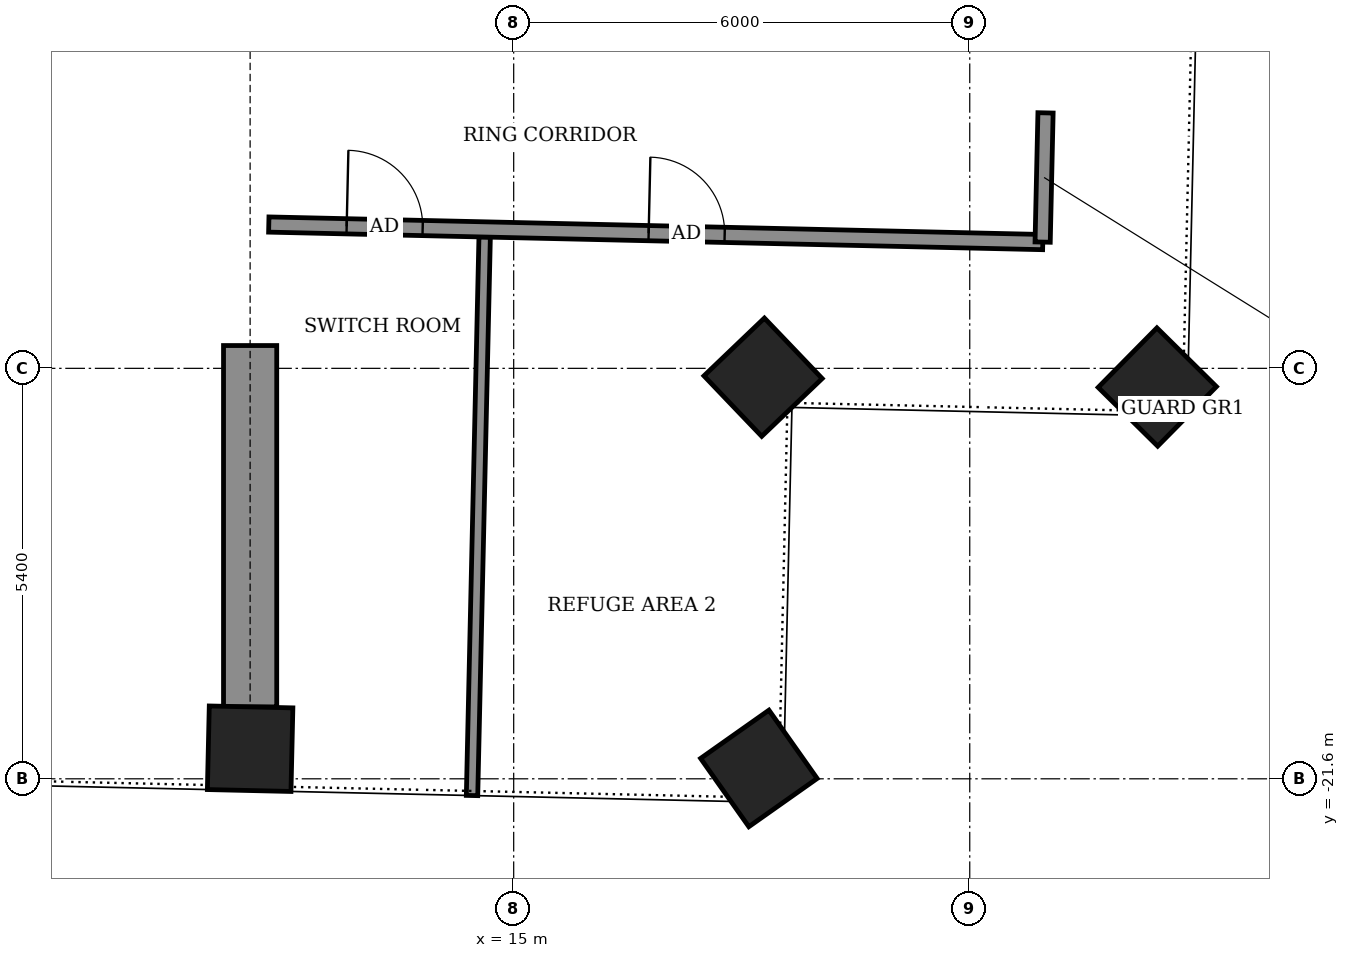
"""IFC4 building model, lengths in metres.
Left out: names, types, materials, properties, quantities, classifications, styles, units other than length and angle.
Written with IfcOpenShell. Run it as: python <this file> out.ifc"""

import sys

from ifc_helpers import new_model, si_unit, direction, frame, frame_2d, origin, origin_2d, place, context, subcontext, project, spatial, rectangle, extrude, element, fill, save


model = new_model("IFC4")
c1 = context("Model", 3, precision=1e-05, world=origin(), true_north=direction((0.0, 1.0)))
c2 = subcontext(c1, "Body", "Model", "MODEL_VIEW")
j1 = project(units=[si_unit("LENGTHUNIT", "METRE"), si_unit("PLANEANGLEUNIT", "RADIAN")], contexts=[c1])
p1 = place(None, origin())
s1 = spatial("IfcSite", under=j1, at=p1, CompositionType="ELEMENT")
p2 = place(p1, origin())
s2 = spatial("IfcBuilding", under=s1, at=p2, CompositionType="ELEMENT")
p3 = place(p2, frame((0.0, 0.0, 219.5)))
s3 = spatial("IfcBuildingStorey", under=s2, at=p3, CompositionType="ELEMENT", Elevation=219.5)
for number, where, z_axis, x_axis in (
    (1, (11.532, -21.204, -0.55), (0.0, 0.0, 1.0), (1.0, -0.023, 0.0)),
    (2, (18.226, -21.464, -0.55), (0.0, 0.0, 1.0), (0.817, 0.577, 0.0)),
    (3, (18.281, -16.316, -0.55), (0.0, 0.0, 1.0), (0.723, 0.691, 0.0)),
    (4, (23.468, -16.446, -0.55), (0.0, 0.0, 1.0), (0.702, 0.712, 0.0)),
):
    element("IfcColumn", number, at=place(p3, frame(where, z_axis=z_axis, x_axis=x_axis)), inside=s3, PredefinedType="COLUMN", context=c2, shape_type="SweptSolid", body=[
        extrude(rectangle(XDim=1.1, YDim=1.1, at=origin_2d()), origin(), (0.0, 0.0, 1.0), 7.0),
    ])
p4 = place(p3, frame((11.532, -15.9, 0.0), z_axis=(0.0, 0.0, 1.0), x_axis=(0.0, -1.0, 0.0)))
e5 = element("IfcWall", 5, at=p4, inside=s3, PredefinedType="SHEAR", context=c2, shape_type="SweptSolid", body=[
    extrude(rectangle(XDim=4.754, YDim=0.7, at=frame_2d((2.377, 0.0))), origin(), (0.0, 0.0, 1.0), 3.0),
])
p5 = place(p3, frame((14.452, -21.82, 0.0), z_axis=(0.0, 0.0, 1.0), x_axis=(0.022587099398, 0.999744878927, 0.0)))
e6 = element("IfcWall", 6, at=p5, inside=s3, PredefinedType="PARTITIONING", context=c2, shape_type="SweptSolid", body=[
    extrude(rectangle(XDim=7.35, YDim=0.15, at=frame_2d((3.675, 0.0))), origin(), (0.0, 0.0, 1.0), 5.75),
])
p6 = place(p3, frame((11.778, -14.308, 0.0), z_axis=(0.0, 0.0, 1.0), x_axis=(0.999742886309, -0.022675124564, 0.0)))
e7 = element("IfcWall", 7, at=p6, inside=s3, PredefinedType="PARTITIONING", context=c2, shape_type="SweptSolid", body=[
    extrude(rectangle(XDim=10.186, YDim=0.2, at=frame_2d((5.093, 0.0))), origin(), (0.0, 0.0, 1.0), 3.0),
])
p7 = place(p6, frame((1.025, 0.0, 0.0)))
e8 = element("IfcOpeningElement", 8, at=p7, cuts=e7, PredefinedType="OPENING", context=c2, shape_type="SweptSolid", body=[
    extrude(rectangle(XDim=1.0, YDim=2.1, at=frame_2d((0.5, 1.05))), frame((0.0, 0.11, 0.0), z_axis=(0.0, -1.0, 0.0), x_axis=(1.0, 0.0, 0.0)), (0.0, 0.0, 1.0), 0.22),
])
p8 = place(p6, frame((4.999, 0.0, 0.0)))
e9 = element("IfcOpeningElement", 9, at=p8, cuts=e7, PredefinedType="OPENING", context=c2, shape_type="SweptSolid", body=[
    extrude(rectangle(XDim=1.0, YDim=2.1, at=frame_2d((0.5, 1.05))), frame((0.0, 0.11, 0.0), z_axis=(0.0, -1.0, 0.0), x_axis=(1.0, 0.0, 0.0)), (0.0, 0.0, 1.0), 0.22),
])
p9 = place(p3, frame((21.959, -14.539, 0.0), z_axis=(0.0, 0.0, 1.0), x_axis=(0.022398515438, 0.999749121783, 0.0)))
e10 = element("IfcWall", 10, at=p9, inside=s3, PredefinedType="PARTITIONING", context=c2, shape_type="SweptSolid", body=[
    extrude(rectangle(XDim=1.7, YDim=0.2, at=frame_2d((0.85, 0.0))), origin(), (0.0, 0.0, 1.0), 6.45),
])
p10 = place(p7, origin())
e11 = element("IfcDoor", 11, at=p10, inside=s3, OperationType="SINGLE_SWING_RIGHT", PredefinedType="DOOR", context=c2, shape_type="SweptSolid", body=[
    extrude(rectangle(XDim=1.0, YDim=2.1, at=frame_2d((0.5, 1.05))), frame((0.0, 0.025, 0.0), z_axis=(0.0, -1.0, 0.0), x_axis=(1.0, 0.0, 0.0)), (0.0, 0.0, 1.0), 0.05),
])
fill(e8, e11)
p11 = place(p8, origin())
e12 = element("IfcDoor", 12, at=p11, inside=s3, OperationType="SINGLE_SWING_LEFT", PredefinedType="DOOR", context=c2, shape_type="SweptSolid", body=[
    extrude(rectangle(XDim=1.0, YDim=2.1, at=frame_2d((0.5, 1.05))), frame((0.0, 0.025, 0.0), z_axis=(0.0, -1.0, 0.0), x_axis=(1.0, 0.0, 0.0)), (0.0, 0.0, 1.0), 0.05),
])
fill(e9, e12)
save(model, sys.argv[1])
